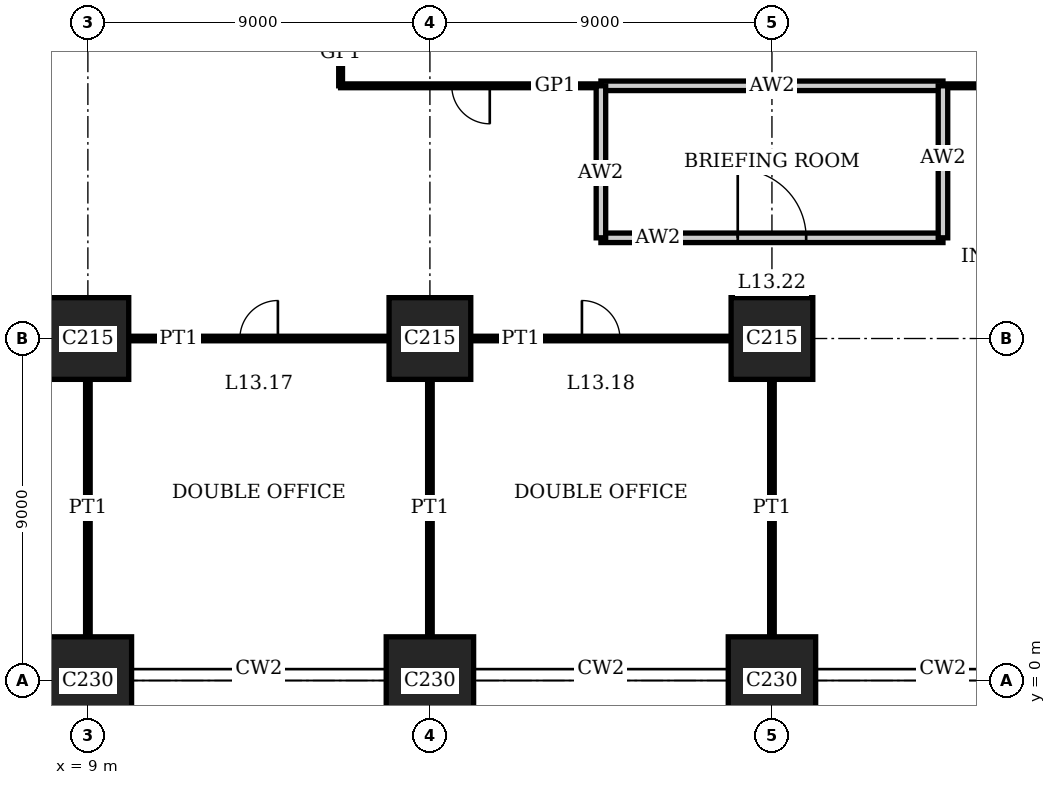
"""IFC4 building model, lengths in metres.
Left out: names, types, materials, properties, quantities, classifications, styles, units other than length and angle.
Written with IfcOpenShell. Run it as: python <this file> out.ifc"""

import sys

from ifc_helpers import new_model, si_unit, direction, frame, frame_2d, origin, origin_2d, place, context, subcontext, project, spatial, rectangle, extrude, element, fill, save


model = new_model("IFC4")
c1 = context("Model", 3, precision=1e-05, world=origin(), true_north=direction((0.0, 1.0)))
c2 = subcontext(c1, "Body", "Model", "MODEL_VIEW")
j1 = project(units=[si_unit("LENGTHUNIT", "METRE"), si_unit("PLANEANGLEUNIT", "RADIAN")], contexts=[c1])
p1 = place(None, origin())
s1 = spatial("IfcSite", under=j1, at=p1, CompositionType="ELEMENT")
p2 = place(p1, origin())
s2 = spatial("IfcBuilding", under=s1, at=p2, CompositionType="ELEMENT")
p3 = place(p2, frame((0.0, 0.0, 55.8)))
s3 = spatial("IfcBuildingStorey", under=s2, at=p3, CompositionType="ELEMENT", Elevation=55.8)
p4 = place(p3, frame((9.0, 0.0, 0.0), z_axis=(0.0, 0.0, 1.0), x_axis=(1.0, 0.0, 0.0)))
e1 = element("IfcColumn", 1, at=p4, inside=s3, PredefinedType="COLUMN", context=c2, shape_type="SweptSolid", body=[
    extrude(rectangle(XDim=2.3, YDim=2.3, at=origin_2d()), origin(), (0.0, 0.0, 1.0), 4.0),
])
p5 = place(p3, frame((9.0, 9.0, 0.0), z_axis=(0.0, 0.0, 1.0), x_axis=(1.0, 0.0, 0.0)))
e2 = element("IfcColumn", 2, at=p5, inside=s3, PredefinedType="COLUMN", context=c2, shape_type="SweptSolid", body=[
    extrude(rectangle(XDim=2.15, YDim=2.15, at=origin_2d()), origin(), (0.0, 0.0, 1.0), 4.0),
])
p6 = place(p3, frame((18.0, 0.0, 0.0), z_axis=(0.0, 0.0, 1.0), x_axis=(1.0, 0.0, 0.0)))
e3 = element("IfcColumn", 3, at=p6, inside=s3, PredefinedType="COLUMN", context=c2, shape_type="SweptSolid", body=[
    extrude(rectangle(XDim=2.3, YDim=2.3, at=origin_2d()), origin(), (0.0, 0.0, 1.0), 4.0),
])
p7 = place(p3, frame((18.0, 9.0, 0.0), z_axis=(0.0, 0.0, 1.0), x_axis=(1.0, 0.0, 0.0)))
e4 = element("IfcColumn", 4, at=p7, inside=s3, PredefinedType="COLUMN", context=c2, shape_type="SweptSolid", body=[
    extrude(rectangle(XDim=2.15, YDim=2.15, at=origin_2d()), origin(), (0.0, 0.0, 1.0), 4.0),
])
p8 = place(p3, frame((27.0, 0.0, 0.0), z_axis=(0.0, 0.0, 1.0), x_axis=(1.0, 0.0, 0.0)))
e5 = element("IfcColumn", 5, at=p8, inside=s3, PredefinedType="COLUMN", context=c2, shape_type="SweptSolid", body=[
    extrude(rectangle(XDim=2.3, YDim=2.3, at=origin_2d()), origin(), (0.0, 0.0, 1.0), 4.0),
])
p9 = place(p3, frame((27.0, 9.0, 0.0), z_axis=(0.0, 0.0, 1.0), x_axis=(1.0, 0.0, 0.0)))
e6 = element("IfcColumn", 6, at=p9, inside=s3, PredefinedType="COLUMN", context=c2, shape_type="SweptSolid", body=[
    extrude(rectangle(XDim=2.15, YDim=2.15, at=origin_2d()), origin(), (0.0, 0.0, 1.0), 4.0),
])
p10 = place(p3, frame((10.075, 9.0, 0.0), z_axis=(0.0, 0.0, 1.0), x_axis=(1.0, 0.0, 0.0)))
e7 = element("IfcWall", 7, at=p10, inside=s3, PredefinedType="PARTITIONING", context=c2, shape_type="SweptSolid", body=[
    extrude(rectangle(XDim=6.85, YDim=0.12, at=frame_2d((3.425, 0.0))), origin(), (0.0, 0.0, 1.0), 3.05),
])
p11 = place(p10, frame((2.925, 0.0, 0.0)))
e8 = element("IfcOpeningElement", 8, at=p11, cuts=e7, PredefinedType="OPENING", context=c2, shape_type="SweptSolid", body=[
    extrude(rectangle(XDim=1.0, YDim=2.4, at=frame_2d((0.5, 1.2))), frame((0.0, 0.07, 0.0), z_axis=(0.0, -1.0, 0.0), x_axis=(1.0, 0.0, 0.0)), (0.0, 0.0, 1.0), 0.14),
])
p12 = place(p3, frame((19.075, 9.0, 0.0), z_axis=(0.0, 0.0, 1.0), x_axis=(1.0, 0.0, 0.0)))
e9 = element("IfcWall", 9, at=p12, inside=s3, PredefinedType="PARTITIONING", context=c2, shape_type="SweptSolid", body=[
    extrude(rectangle(XDim=6.85, YDim=0.12, at=frame_2d((3.425, 0.0))), origin(), (0.0, 0.0, 1.0), 3.05),
])
p13 = place(p12, frame((2.925, 0.0, 0.0)))
e10 = element("IfcOpeningElement", 10, at=p13, cuts=e9, PredefinedType="OPENING", context=c2, shape_type="SweptSolid", body=[
    extrude(rectangle(XDim=1.0, YDim=2.4, at=frame_2d((0.5, 1.2))), frame((0.0, 0.07, 0.0), z_axis=(0.0, -1.0, 0.0), x_axis=(1.0, 0.0, 0.0)), (0.0, 0.0, 1.0), 0.14),
])
p14 = place(p3, frame((22.5, 11.65, 0.0), z_axis=(0.0, 0.0, 1.0), x_axis=(1.0, 0.0, 0.0)))
e11 = element("IfcWall", 11, at=p14, inside=s3, PredefinedType="PARTITIONING", context=c2, shape_type="SweptSolid", body=[
    extrude(rectangle(XDim=9.0, YDim=0.25, at=frame_2d((4.5, 0.0))), origin(), (0.0, 0.0, 1.0), 3.75),
])
p15 = place(p14, frame((3.6, 0.0, 0.0)))
e12 = element("IfcOpeningElement", 12, at=p15, cuts=e11, PredefinedType="OPENING", context=c2, shape_type="SweptSolid", body=[
    extrude(rectangle(XDim=1.8, YDim=2.4, at=frame_2d((0.9, 1.2))), frame((0.0, 0.135, 0.0), z_axis=(0.0, -1.0, 0.0), x_axis=(1.0, 0.0, 0.0)), (0.0, 0.0, 1.0), 0.27),
])
p16 = place(p3, frame((22.5, 15.65, 0.0), z_axis=(0.0, 0.0, 1.0), x_axis=(1.0, 0.0, 0.0)))
e13 = element("IfcWall", 13, at=p16, inside=s3, PredefinedType="PARTITIONING", context=c2, shape_type="SweptSolid", body=[
    extrude(rectangle(XDim=9.0, YDim=0.25, at=frame_2d((4.5, 0.0))), origin(), (0.0, 0.0, 1.0), 3.75),
])
p17 = place(p3, frame((15.65, 15.65, 0.0), z_axis=(0.0, 0.0, 1.0), x_axis=(1.0, 0.0, 0.0)))
e14 = element("IfcWall", 14, at=p17, inside=s3, PredefinedType="PARTITIONING", context=c2, shape_type="SweptSolid", body=[
    extrude(rectangle(XDim=6.85, YDim=0.1, at=frame_2d((3.425, 0.0))), origin(), (0.0, 0.0, 1.0), 3.75),
])
p18 = place(p17, frame((2.925, 0.0, 0.0)))
e15 = element("IfcOpeningElement", 15, at=p18, cuts=e14, PredefinedType="OPENING", context=c2, shape_type="SweptSolid", body=[
    extrude(rectangle(XDim=1.0, YDim=2.4, at=frame_2d((0.5, 1.2))), frame((0.0, 0.06, 0.0), z_axis=(0.0, -1.0, 0.0), x_axis=(1.0, 0.0, 0.0)), (0.0, 0.0, 1.0), 0.12),
])
p19 = place(p3, frame((31.5, 15.65, 0.0), z_axis=(0.0, 0.0, 1.0), x_axis=(1.0, 0.0, 0.0)))
e16 = element("IfcWall", 16, at=p19, inside=s3, PredefinedType="PARTITIONING", context=c2, shape_type="SweptSolid", body=[
    extrude(rectangle(XDim=15.85, YDim=0.1, at=frame_2d((7.925, 0.0))), origin(), (0.0, 0.0, 1.0), 3.75),
])
p20 = place(p3, frame((9.0, 1.15, 0.0), z_axis=(0.0, 0.0, 1.0), x_axis=(0.0, 1.0, 0.0)))
e17 = element("IfcWall", 17, at=p20, inside=s3, PredefinedType="PARTITIONING", context=c2, shape_type="SweptSolid", body=[
    extrude(rectangle(XDim=6.775, YDim=0.12, at=frame_2d((3.388, 0.0))), origin(), (0.0, 0.0, 1.0), 3.05),
])
p21 = place(p3, frame((15.65, 15.65, 0.0), z_axis=(0.0, 0.0, 1.0), x_axis=(0.0, 1.0, 0.0)))
e18 = element("IfcWall", 18, at=p21, inside=s3, PredefinedType="PARTITIONING", context=c2, shape_type="SweptSolid", body=[
    extrude(rectangle(XDim=2.35, YDim=0.1, at=frame_2d((1.175, 0.0))), origin(), (0.0, 0.0, 1.0), 3.75),
])
p22 = place(p3, frame((18.0, 1.15, 0.0), z_axis=(0.0, 0.0, 1.0), x_axis=(0.0, 1.0, 0.0)))
e19 = element("IfcWall", 19, at=p22, inside=s3, PredefinedType="PARTITIONING", context=c2, shape_type="SweptSolid", body=[
    extrude(rectangle(XDim=6.775, YDim=0.12, at=frame_2d((3.388, 0.0))), origin(), (0.0, 0.0, 1.0), 3.05),
])
p23 = place(p3, frame((22.5, 11.65, 0.0), z_axis=(0.0, 0.0, 1.0), x_axis=(0.0, 1.0, 0.0)))
e20 = element("IfcWall", 20, at=p23, inside=s3, PredefinedType="PARTITIONING", context=c2, shape_type="SweptSolid", body=[
    extrude(rectangle(XDim=4.0, YDim=0.25, at=frame_2d((2.0, 0.0))), origin(), (0.0, 0.0, 1.0), 3.75),
])
p24 = place(p3, frame((27.0, 1.15, 0.0), z_axis=(0.0, 0.0, 1.0), x_axis=(0.0, 1.0, 0.0)))
e21 = element("IfcWall", 21, at=p24, inside=s3, PredefinedType="PARTITIONING", context=c2, shape_type="SweptSolid", body=[
    extrude(rectangle(XDim=6.775, YDim=0.12, at=frame_2d((3.388, 0.0))), origin(), (0.0, 0.0, 1.0), 3.05),
])
p25 = place(p3, frame((31.5, 11.65, 0.0), z_axis=(0.0, 0.0, 1.0), x_axis=(0.0, 1.0, 0.0)))
e22 = element("IfcWall", 22, at=p25, inside=s3, PredefinedType="PARTITIONING", context=c2, shape_type="SweptSolid", body=[
    extrude(rectangle(XDim=4.0, YDim=0.25, at=frame_2d((2.0, 0.0))), origin(), (0.0, 0.0, 1.0), 3.75),
])
p26 = place(p11, origin())
e23 = element("IfcDoor", 23, at=p26, inside=s3, OperationType="SINGLE_SWING_LEFT", PredefinedType="DOOR", context=c2, shape_type="SweptSolid", body=[
    extrude(rectangle(XDim=1.0, YDim=2.4, at=frame_2d((0.5, 1.2))), frame((0.0, 0.025, 0.0), z_axis=(0.0, -1.0, 0.0), x_axis=(1.0, 0.0, 0.0)), (0.0, 0.0, 1.0), 0.05),
])
fill(e8, e23)
p27 = place(p13, origin())
e24 = element("IfcDoor", 24, at=p27, inside=s3, OperationType="SINGLE_SWING_RIGHT", PredefinedType="DOOR", context=c2, shape_type="SweptSolid", body=[
    extrude(rectangle(XDim=1.0, YDim=2.4, at=frame_2d((0.5, 1.2))), frame((0.0, 0.025, 0.0), z_axis=(0.0, -1.0, 0.0), x_axis=(1.0, 0.0, 0.0)), (0.0, 0.0, 1.0), 0.05),
])
fill(e10, e24)
p28 = place(p15, origin())
e25 = element("IfcDoor", 25, at=p28, inside=s3, OperationType="DOUBLE_DOOR_SINGLE_SWING", PredefinedType="DOOR", context=c2, shape_type="SweptSolid", body=[
    extrude(rectangle(XDim=1.8, YDim=2.4, at=frame_2d((0.9, 1.2))), frame((0.0, 0.025, 0.0), z_axis=(0.0, -1.0, 0.0), x_axis=(1.0, 0.0, 0.0)), (0.0, 0.0, 1.0), 0.05),
])
fill(e12, e25)
p29 = place(p18, origin())
e26 = element("IfcDoor", 26, at=p29, inside=s3, OperationType="SINGLE_SWING_RIGHT", PredefinedType="DOOR", context=c2, shape_type="SweptSolid", body=[
    extrude(rectangle(XDim=1.0, YDim=2.4, at=frame_2d((0.5, 1.2))), frame((0.0, 0.02, 0.0), z_axis=(0.0, -1.0, 0.0), x_axis=(1.0, 0.0, 0.0)), (0.0, 0.0, 1.0), 0.04),
])
fill(e15, e26)
save(model, sys.argv[1])
